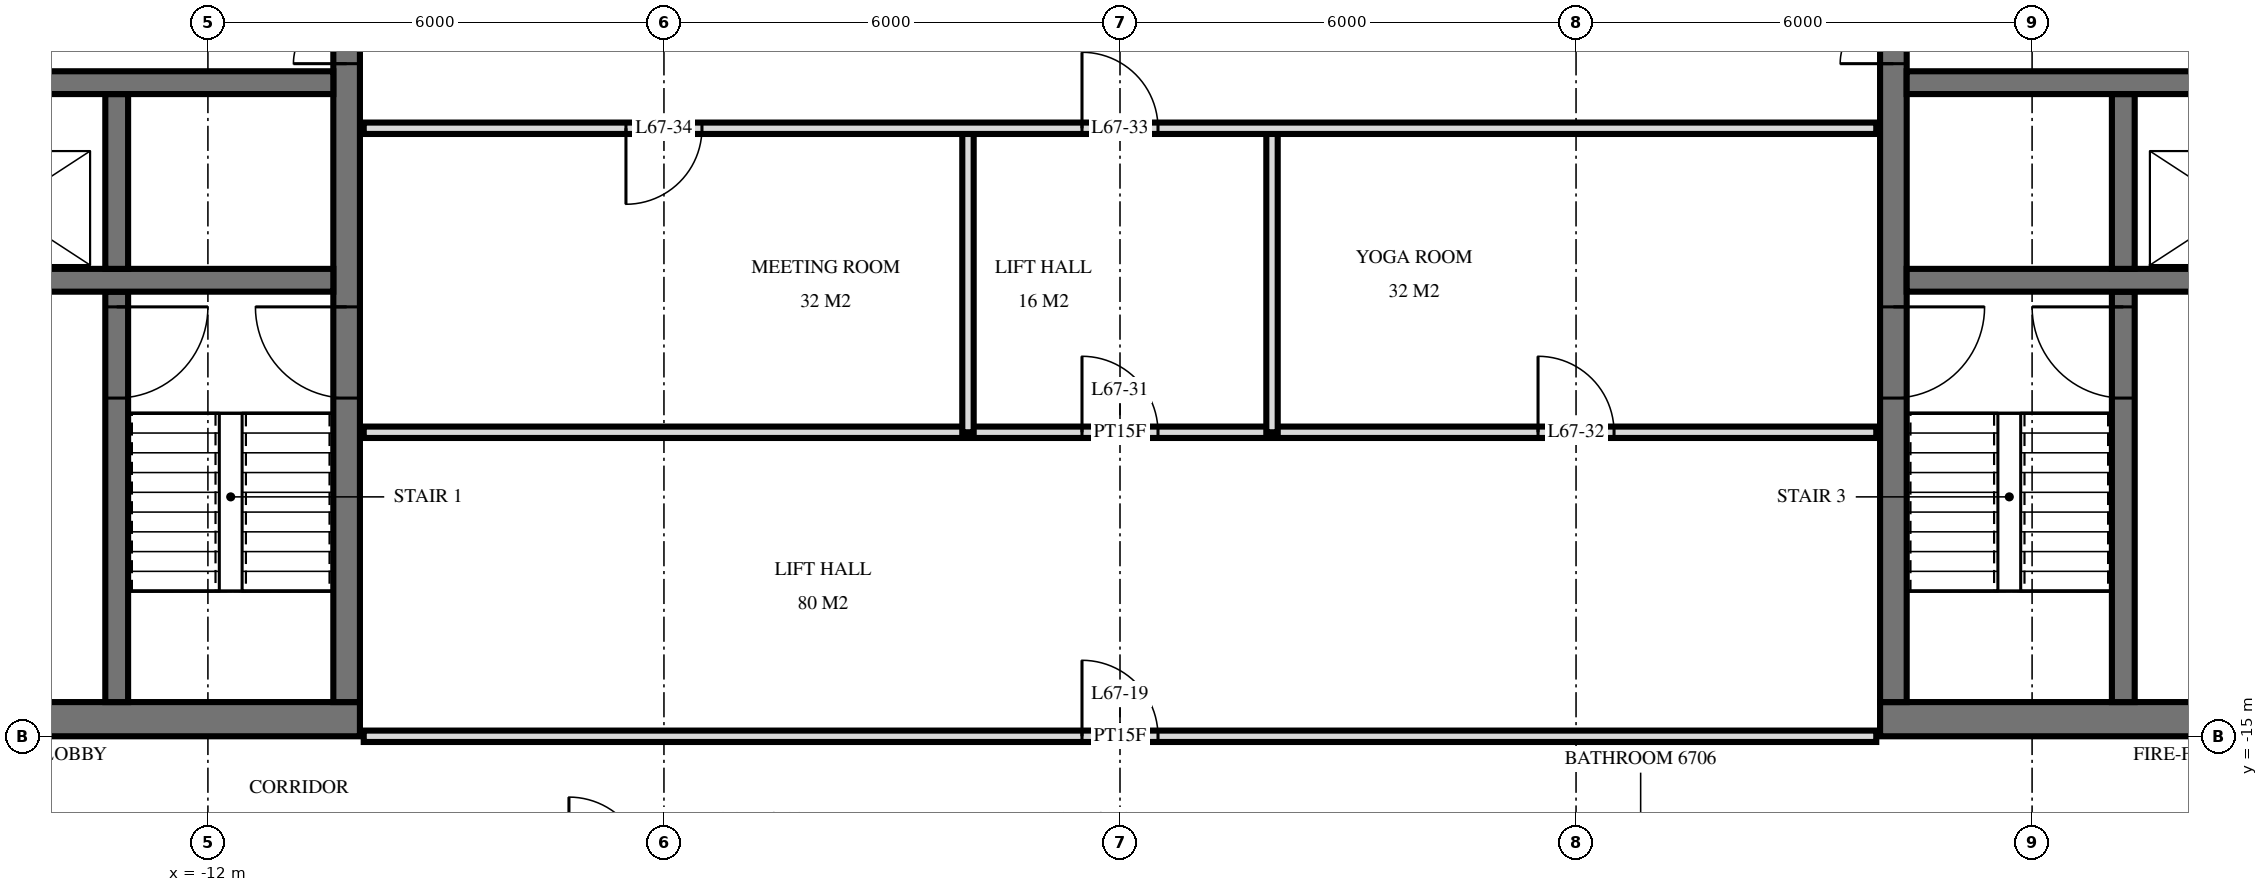
"""IFC4 building model, lengths in metres.
Left out: names, types, materials, properties, quantities, classifications, styles, units other than length and angle.
Written with IfcOpenShell. Run it as: python <this file> out.ifc"""

import sys

from ifc_helpers import new_model, si_unit, direction, frame, frame_2d, origin, place, context, subcontext, project, spatial, rectangle, extrude, element, fill, save


model = new_model("IFC4")
c1 = context("Model", 3, precision=1e-05, world=origin(), true_north=direction((0.0, 1.0)))
c2 = subcontext(c1, "Body", "Model", "MODEL_VIEW")
j1 = project(units=[si_unit("LENGTHUNIT", "METRE"), si_unit("PLANEANGLEUNIT", "RADIAN")], contexts=[c1])
p1 = place(None, origin())
s1 = spatial("IfcSite", under=j1, at=p1, CompositionType="ELEMENT")
p2 = place(p1, origin())
s2 = spatial("IfcBuilding", under=s1, at=p2, CompositionType="ELEMENT")
p3 = place(p2, frame((0.0, 0.0, 256.1)))
s3 = spatial("IfcBuildingStorey", under=s2, at=p3, CompositionType="ELEMENT", Elevation=256.1)
p4 = place(p3, frame((-19.5, -14.775, 0.0), z_axis=(0.0, 0.0, 1.0), x_axis=(1.0, 0.0, 0.0)))
e1 = element("IfcWall", 1, at=p4, inside=s3, PredefinedType="SHEAR", context=c2, shape_type="SweptSolid", body=[
    extrude(rectangle(XDim=9.5, YDim=0.45, at=frame_2d((4.75, 0.0))), origin(), (0.0, 0.0, 1.0), 3.5),
])
p5 = place(p4, frame((1.2, 0.0, 0.0)))
e2 = element("IfcOpeningElement", 2, at=p5, cuts=e1, PredefinedType="OPENING", context=c2, shape_type="SweptSolid", body=[
    extrude(rectangle(XDim=1.2, YDim=2.1, at=frame_2d((0.6, 1.05))), frame((0.0, 0.235, 0.0), z_axis=(0.0, -1.0, 0.0), x_axis=(1.0, 0.0, 0.0)), (0.0, 0.0, 1.0), 0.47),
])
p6 = place(p4, frame((4.25, 0.0, 0.0)))
e3 = element("IfcOpeningElement", 3, at=p6, cuts=e1, PredefinedType="OPENING", context=c2, shape_type="SweptSolid", body=[
    extrude(rectangle(XDim=1.1, YDim=2.1, at=frame_2d((0.55, 1.05))), frame((0.0, 0.235, 0.0), z_axis=(0.0, -1.0, 0.0), x_axis=(1.0, 0.0, 0.0)), (0.0, 0.0, 1.0), 0.47),
])
p7 = place(p3, frame((-10.175, -14.55, 0.0), z_axis=(0.0, 0.0, 1.0), x_axis=(0.0, 1.0, 0.0)))
e4 = element("IfcWall", 4, at=p7, inside=s3, PredefinedType="SHEAR", context=c2, shape_type="SweptSolid", body=[
    extrude(rectangle(XDim=14.1, YDim=0.35, at=frame_2d((7.05, 0.0))), origin(), (0.0, 0.0, 1.0), 3.5),
])
p8 = place(p7, frame((8.4, 0.0, 0.0)))
e5 = element("IfcOpeningElement", 5, at=p8, cuts=e4, PredefinedType="OPENING", context=c2, shape_type="SweptSolid", body=[
    extrude(rectangle(XDim=1.4, YDim=2.4, at=frame_2d((0.7, 1.2))), frame((0.0, 0.185, 0.0), z_axis=(0.0, -1.0, 0.0), x_axis=(1.0, 0.0, 0.0)), (0.0, 0.0, 1.0), 0.37),
])
p9 = place(p7, frame((10.0, 0.0, 0.0)))
e6 = element("IfcOpeningElement", 6, at=p9, cuts=e4, PredefinedType="OPENING", context=c2, shape_type="SweptSolid", body=[
    extrude(rectangle(XDim=1.4, YDim=2.4, at=frame_2d((0.7, 1.2))), frame((0.0, 0.185, 0.0), z_axis=(0.0, -1.0, 0.0), x_axis=(1.0, 0.0, 0.0)), (0.0, 0.0, 1.0), 0.37),
])
p10 = place(p7, frame((4.0, 0.0, 0.0)))
e7 = element("IfcOpeningElement", 7, at=p10, cuts=e4, PredefinedType="OPENING", context=c2, shape_type="SweptSolid", body=[
    extrude(rectangle(XDim=1.2, YDim=2.1, at=frame_2d((0.6, 1.05))), frame((0.0, 0.185, 0.0), z_axis=(0.0, -1.0, 0.0), x_axis=(1.0, 0.0, 0.0)), (0.0, 0.0, 1.0), 0.37),
])
p11 = place(p3, frame((-19.05, -6.4, 0.0), z_axis=(0.0, 0.0, 1.0), x_axis=(1.0, 0.0, 0.0)))
e8 = element("IfcWall", 8, at=p11, inside=s3, PredefinedType="SHEAR", context=c2, shape_type="SweptSolid", body=[
    extrude(rectangle(XDim=8.7, YDim=0.3, at=frame_2d((4.35, 0.0))), origin(), (0.0, 0.0, 1.0), 3.5),
])
p12 = place(p11, frame((0.8, 0.0, 0.0)))
e9 = element("IfcOpeningElement", 9, at=p12, cuts=e8, PredefinedType="OPENING", context=c2, shape_type="SweptSolid", body=[
    extrude(rectangle(XDim=1.1, YDim=2.1, at=frame_2d((0.55, 1.05))), frame((0.0, 0.16, 0.0), z_axis=(0.0, -1.0, 0.0), x_axis=(1.0, 0.0, 0.0)), (0.0, 0.0, 1.0), 0.32),
])
p13 = place(p3, frame((-19.05, -9.0, 0.0), z_axis=(0.0, 0.0, 1.0), x_axis=(1.0, 0.0, 0.0)))
e10 = element("IfcWall", 10, at=p13, inside=s3, PredefinedType="SHEAR", context=c2, shape_type="SweptSolid", body=[
    extrude(rectangle(XDim=8.7, YDim=0.3, at=frame_2d((4.35, 0.0))), origin(), (0.0, 0.0, 1.0), 3.5),
])
p14 = place(p13, frame((3.8, 0.0, 0.0)))
e11 = element("IfcOpeningElement", 11, at=p14, cuts=e10, PredefinedType="OPENING", context=c2, shape_type="SweptSolid", body=[
    extrude(rectangle(XDim=1.1, YDim=2.1, at=frame_2d((0.55, 1.05))), frame((0.0, 0.16, 0.0), z_axis=(0.0, -1.0, 0.0), x_axis=(1.0, 0.0, 0.0)), (0.0, 0.0, 1.0), 0.32),
])
p15 = place(p3, frame((-13.2, -8.85, 0.0), z_axis=(0.0, 0.0, 1.0), x_axis=(0.0, 1.0, 0.0)))
e12 = element("IfcWall", 12, at=p15, inside=s3, PredefinedType="SHEAR", context=c2, shape_type="SweptSolid", body=[
    extrude(rectangle(XDim=2.3, YDim=0.3, at=frame_2d((1.15, 0.0))), origin(), (0.0, 0.0, 1.0), 3.5),
])
p16 = place(p3, frame((-13.2, -14.55, 0.0), z_axis=(0.0, 0.0, 1.0), x_axis=(0.0, 1.0, 0.0)))
e13 = element("IfcWall", 13, at=p16, inside=s3, PredefinedType="SHEAR", context=c2, shape_type="SweptSolid", body=[
    extrude(rectangle(XDim=5.4, YDim=0.3, at=frame_2d((2.7, 0.0))), origin(), (0.0, 0.0, 1.0), 3.5),
])
p17 = place(p16, frame((4.0, 0.0, 0.0)))
e14 = element("IfcOpeningElement", 14, at=p17, cuts=e13, PredefinedType="OPENING", context=c2, shape_type="SweptSolid", body=[
    extrude(rectangle(XDim=1.2, YDim=2.1, at=frame_2d((0.6, 1.05))), frame((0.0, 0.16, 0.0), z_axis=(0.0, -1.0, 0.0), x_axis=(1.0, 0.0, 0.0)), (0.0, 0.0, 1.0), 0.32),
])
p18 = place(p3, frame((10.0, -14.775, 0.0), z_axis=(0.0, 0.0, 1.0), x_axis=(1.0, 0.0, 0.0)))
e15 = element("IfcWall", 15, at=p18, inside=s3, PredefinedType="SHEAR", context=c2, shape_type="SweptSolid", body=[
    extrude(rectangle(XDim=9.5, YDim=0.45, at=frame_2d((4.75, 0.0))), origin(), (0.0, 0.0, 1.0), 3.5),
])
p19 = place(p18, frame((7.1, 0.0, 0.0)))
e16 = element("IfcOpeningElement", 16, at=p19, cuts=e15, PredefinedType="OPENING", context=c2, shape_type="SweptSolid", body=[
    extrude(rectangle(XDim=1.2, YDim=2.1, at=frame_2d((0.6, 1.05))), frame((0.0, 0.235, 0.0), z_axis=(0.0, -1.0, 0.0), x_axis=(1.0, 0.0, 0.0)), (0.0, 0.0, 1.0), 0.47),
])
p20 = place(p18, frame((4.15, 0.0, 0.0)))
e17 = element("IfcOpeningElement", 17, at=p20, cuts=e15, PredefinedType="OPENING", context=c2, shape_type="SweptSolid", body=[
    extrude(rectangle(XDim=1.1, YDim=2.1, at=frame_2d((0.55, 1.05))), frame((0.0, 0.235, 0.0), z_axis=(0.0, -1.0, 0.0), x_axis=(1.0, 0.0, 0.0)), (0.0, 0.0, 1.0), 0.47),
])
p21 = place(p3, frame((10.175, -14.55, 0.0), z_axis=(0.0, 0.0, 1.0), x_axis=(0.0, 1.0, 0.0)))
e18 = element("IfcWall", 18, at=p21, inside=s3, PredefinedType="SHEAR", context=c2, shape_type="SweptSolid", body=[
    extrude(rectangle(XDim=14.1, YDim=0.35, at=frame_2d((7.05, 0.0))), origin(), (0.0, 0.0, 1.0), 3.5),
])
p22 = place(p21, frame((8.4, 0.0, 0.0)))
e19 = element("IfcOpeningElement", 19, at=p22, cuts=e18, PredefinedType="OPENING", context=c2, shape_type="SweptSolid", body=[
    extrude(rectangle(XDim=1.4, YDim=2.4, at=frame_2d((0.7, 1.2))), frame((0.0, 0.185, 0.0), z_axis=(0.0, -1.0, 0.0), x_axis=(1.0, 0.0, 0.0)), (0.0, 0.0, 1.0), 0.37),
])
p23 = place(p21, frame((10.0, 0.0, 0.0)))
e20 = element("IfcOpeningElement", 20, at=p23, cuts=e18, PredefinedType="OPENING", context=c2, shape_type="SweptSolid", body=[
    extrude(rectangle(XDim=1.4, YDim=2.4, at=frame_2d((0.7, 1.2))), frame((0.0, 0.185, 0.0), z_axis=(0.0, -1.0, 0.0), x_axis=(1.0, 0.0, 0.0)), (0.0, 0.0, 1.0), 0.37),
])
p24 = place(p21, frame((4.0, 0.0, 0.0)))
e21 = element("IfcOpeningElement", 21, at=p24, cuts=e18, PredefinedType="OPENING", context=c2, shape_type="SweptSolid", body=[
    extrude(rectangle(XDim=1.2, YDim=2.1, at=frame_2d((0.6, 1.05))), frame((0.0, 0.185, 0.0), z_axis=(0.0, -1.0, 0.0), x_axis=(1.0, 0.0, 0.0)), (0.0, 0.0, 1.0), 0.37),
])
p25 = place(p3, frame((10.35, -6.4, 0.0), z_axis=(0.0, 0.0, 1.0), x_axis=(1.0, 0.0, 0.0)))
e22 = element("IfcWall", 22, at=p25, inside=s3, PredefinedType="SHEAR", context=c2, shape_type="SweptSolid", body=[
    extrude(rectangle(XDim=8.7, YDim=0.3, at=frame_2d((4.35, 0.0))), origin(), (0.0, 0.0, 1.0), 3.5),
])
p26 = place(p25, frame((6.8, 0.0, 0.0)))
e23 = element("IfcOpeningElement", 23, at=p26, cuts=e22, PredefinedType="OPENING", context=c2, shape_type="SweptSolid", body=[
    extrude(rectangle(XDim=1.1, YDim=2.1, at=frame_2d((0.55, 1.05))), frame((0.0, 0.16, 0.0), z_axis=(0.0, -1.0, 0.0), x_axis=(1.0, 0.0, 0.0)), (0.0, 0.0, 1.0), 0.32),
])
p27 = place(p3, frame((10.35, -9.0, 0.0), z_axis=(0.0, 0.0, 1.0), x_axis=(1.0, 0.0, 0.0)))
e24 = element("IfcWall", 24, at=p27, inside=s3, PredefinedType="SHEAR", context=c2, shape_type="SweptSolid", body=[
    extrude(rectangle(XDim=8.7, YDim=0.3, at=frame_2d((4.35, 0.0))), origin(), (0.0, 0.0, 1.0), 3.5),
])
p28 = place(p27, frame((3.8, 0.0, 0.0)))
e25 = element("IfcOpeningElement", 25, at=p28, cuts=e24, PredefinedType="OPENING", context=c2, shape_type="SweptSolid", body=[
    extrude(rectangle(XDim=1.1, YDim=2.1, at=frame_2d((0.55, 1.05))), frame((0.0, 0.16, 0.0), z_axis=(0.0, -1.0, 0.0), x_axis=(1.0, 0.0, 0.0)), (0.0, 0.0, 1.0), 0.32),
])
p29 = place(p3, frame((13.2, -8.85, 0.0), z_axis=(0.0, 0.0, 1.0), x_axis=(0.0, 1.0, 0.0)))
e26 = element("IfcWall", 26, at=p29, inside=s3, PredefinedType="SHEAR", context=c2, shape_type="SweptSolid", body=[
    extrude(rectangle(XDim=2.3, YDim=0.3, at=frame_2d((1.15, 0.0))), origin(), (0.0, 0.0, 1.0), 3.5),
])
p30 = place(p3, frame((13.2, -14.55, 0.0), z_axis=(0.0, 0.0, 1.0), x_axis=(0.0, 1.0, 0.0)))
e27 = element("IfcWall", 27, at=p30, inside=s3, PredefinedType="SHEAR", context=c2, shape_type="SweptSolid", body=[
    extrude(rectangle(XDim=5.4, YDim=0.3, at=frame_2d((2.7, 0.0))), origin(), (0.0, 0.0, 1.0), 3.5),
])
p31 = place(p30, frame((4.0, 0.0, 0.0)))
e28 = element("IfcOpeningElement", 28, at=p31, cuts=e27, PredefinedType="OPENING", context=c2, shape_type="SweptSolid", body=[
    extrude(rectangle(XDim=1.2, YDim=2.1, at=frame_2d((0.6, 1.05))), frame((0.0, 0.16, 0.0), z_axis=(0.0, -1.0, 0.0), x_axis=(1.0, 0.0, 0.0)), (0.0, 0.0, 1.0), 0.32),
])
for number, where, z_axis, x_axis in (
    (29, (2.0, -11.0, 0.0), (0.0, 0.0, 1.0), (0.0, 1.0, 0.0)),
    (30, (-2.0, -11.0, 0.0), (0.0, 0.0, 1.0), (0.0, 1.0, 0.0)),
):
    element("IfcWall", number, at=place(p3, frame(where, z_axis=z_axis, x_axis=x_axis)), inside=s3, PredefinedType="PARTITIONING", context=c2, shape_type="SweptSolid", body=[
        extrude(rectangle(XDim=4.0, YDim=0.15, at=frame_2d((2.0, 0.0))), origin(), (0.0, 0.0, 1.0), 3.22),
    ])
p32 = place(p3, frame((-9.95, -15.0, 0.0), z_axis=(0.0, 0.0, 1.0), x_axis=(1.0, 0.0, 0.0)))
e31 = element("IfcWall", 31, at=p32, inside=s3, PredefinedType="PARTITIONING", context=c2, shape_type="SweptSolid", body=[
    extrude(rectangle(XDim=19.9, YDim=0.15, at=frame_2d((9.95, 0.0))), origin(), (0.0, 0.0, 1.0), 2.584),
])
p33 = place(p32, frame((9.45, 0.0, 0.0)))
e32 = element("IfcOpeningElement", 32, at=p33, cuts=e31, PredefinedType="OPENING", context=c2, shape_type="SweptSolid", body=[
    extrude(rectangle(XDim=1.0, YDim=2.1, at=frame_2d((0.5, 1.05))), frame((0.0, 0.085, 0.0), z_axis=(0.0, -1.0, 0.0), x_axis=(1.0, 0.0, 0.0)), (0.0, 0.0, 1.0), 0.17),
])
p34 = place(p3, frame((-9.95, -11.0, 0.0), z_axis=(0.0, 0.0, 1.0), x_axis=(1.0, 0.0, 0.0)))
e33 = element("IfcWall", 33, at=p34, inside=s3, PredefinedType="PARTITIONING", context=c2, shape_type="SweptSolid", body=[
    extrude(rectangle(XDim=19.9, YDim=0.15, at=frame_2d((9.95, 0.0))), origin(), (0.0, 0.0, 1.0), 3.22),
])
p35 = place(p34, frame((9.45, 0.0, 0.0)))
e34 = element("IfcOpeningElement", 34, at=p35, cuts=e33, PredefinedType="OPENING", context=c2, shape_type="SweptSolid", body=[
    extrude(rectangle(XDim=1.0, YDim=2.1, at=frame_2d((0.5, 1.05))), frame((0.0, 0.085, 0.0), z_axis=(0.0, -1.0, 0.0), x_axis=(1.0, 0.0, 0.0)), (0.0, 0.0, 1.0), 0.17),
])
p36 = place(p34, frame((15.45, 0.0, 0.0)))
e35 = element("IfcOpeningElement", 35, at=p36, cuts=e33, PredefinedType="OPENING", context=c2, shape_type="SweptSolid", body=[
    extrude(rectangle(XDim=1.0, YDim=2.1, at=frame_2d((0.5, 1.05))), frame((0.0, 0.085, 0.0), z_axis=(0.0, -1.0, 0.0), x_axis=(1.0, 0.0, 0.0)), (0.0, 0.0, 1.0), 0.17),
])
p37 = place(p3, frame((-9.95, -7.0, 0.0), z_axis=(0.0, 0.0, 1.0), x_axis=(1.0, 0.0, 0.0)))
e36 = element("IfcWall", 36, at=p37, inside=s3, PredefinedType="PARTITIONING", context=c2, shape_type="SweptSolid", body=[
    extrude(rectangle(XDim=19.9, YDim=0.15, at=frame_2d((9.95, 0.0))), origin(), (0.0, 0.0, 1.0), 3.22),
])
p38 = place(p37, frame((9.45, 0.0, 0.0)))
e37 = element("IfcOpeningElement", 37, at=p38, cuts=e36, PredefinedType="OPENING", context=c2, shape_type="SweptSolid", body=[
    extrude(rectangle(XDim=1.0, YDim=2.1, at=frame_2d((0.5, 1.05))), frame((0.0, 0.085, 0.0), z_axis=(0.0, -1.0, 0.0), x_axis=(1.0, 0.0, 0.0)), (0.0, 0.0, 1.0), 0.17),
])
p39 = place(p37, frame((3.45, 0.0, 0.0)))
e38 = element("IfcOpeningElement", 38, at=p39, cuts=e36, PredefinedType="OPENING", context=c2, shape_type="SweptSolid", body=[
    extrude(rectangle(XDim=1.0, YDim=2.1, at=frame_2d((0.5, 1.05))), frame((0.0, 0.085, 0.0), z_axis=(0.0, -1.0, 0.0), x_axis=(1.0, 0.0, 0.0)), (0.0, 0.0, 1.0), 0.17),
])
p40 = place(p8, origin())
e39 = element("IfcDoor", 39, at=p40, inside=s3, OperationType="DOUBLE_DOOR_SINGLE_SWING", PredefinedType="DOOR", context=c2, shape_type="SweptSolid", body=[
    extrude(rectangle(XDim=1.4, YDim=2.4, at=frame_2d((0.7, 1.2))), frame((0.0, 0.025, 0.0), z_axis=(0.0, -1.0, 0.0), x_axis=(1.0, 0.0, 0.0)), (0.0, 0.0, 1.0), 0.05),
])
fill(e5, e39)
p41 = place(p10, origin())
e40 = element("IfcDoor", 40, at=p41, inside=s3, OperationType="SINGLE_SWING_LEFT", PredefinedType="DOOR", context=c2, shape_type="SweptSolid", body=[
    extrude(rectangle(XDim=1.2, YDim=2.1, at=frame_2d((0.6, 1.05))), frame((0.0, 0.025, 0.0), z_axis=(0.0, -1.0, 0.0), x_axis=(1.0, 0.0, 0.0)), (0.0, 0.0, 1.0), 0.05),
])
fill(e7, e40)
p42 = place(p17, frame((0.6, 0.0, 0.0), z_axis=(0.0, 0.0, 1.0), x_axis=(-1.0, 0.0, 0.0)))
e41 = element("IfcDoor", 41, at=p42, inside=s3, OperationType="SINGLE_SWING_RIGHT", PredefinedType="DOOR", context=c2, shape_type="SweptSolid", body=[
    extrude(rectangle(XDim=1.2, YDim=2.1, at=frame_2d((0.0, 1.05))), frame((0.0, -0.025, 0.0), z_axis=(0.0, 1.0, 0.0), x_axis=(-1.0, 0.0, 0.0)), (0.0, 0.0, 1.0), 0.05),
])
fill(e14, e41)
p43 = place(p22, origin())
e42 = element("IfcDoor", 42, at=p43, inside=s3, OperationType="DOUBLE_DOOR_SINGLE_SWING", PredefinedType="DOOR", context=c2, shape_type="SweptSolid", body=[
    extrude(rectangle(XDim=1.4, YDim=2.4, at=frame_2d((0.7, 1.2))), frame((0.0, 0.025, 0.0), z_axis=(0.0, -1.0, 0.0), x_axis=(1.0, 0.0, 0.0)), (0.0, 0.0, 1.0), 0.05),
])
fill(e19, e42)
p44 = place(p24, frame((0.6, 0.0, 0.0), z_axis=(0.0, 0.0, 1.0), x_axis=(-1.0, 0.0, 0.0)))
e43 = element("IfcDoor", 43, at=p44, inside=s3, OperationType="SINGLE_SWING_RIGHT", PredefinedType="DOOR", context=c2, shape_type="SweptSolid", body=[
    extrude(rectangle(XDim=1.2, YDim=2.1, at=frame_2d((0.0, 1.05))), frame((0.0, -0.025, 0.0), z_axis=(0.0, 1.0, 0.0), x_axis=(-1.0, 0.0, 0.0)), (0.0, 0.0, 1.0), 0.05),
])
fill(e21, e43)
p45 = place(p31, origin())
e44 = element("IfcDoor", 44, at=p45, inside=s3, OperationType="SINGLE_SWING_LEFT", PredefinedType="DOOR", context=c2, shape_type="SweptSolid", body=[
    extrude(rectangle(XDim=1.2, YDim=2.1, at=frame_2d((0.6, 1.05))), frame((0.0, 0.025, 0.0), z_axis=(0.0, -1.0, 0.0), x_axis=(1.0, 0.0, 0.0)), (0.0, 0.0, 1.0), 0.05),
])
fill(e28, e44)
p46 = place(p33, origin())
e45 = element("IfcDoor", 45, at=p46, inside=s3, OperationType="SINGLE_SWING_RIGHT", PredefinedType="DOOR", context=c2, shape_type="SweptSolid", body=[
    extrude(rectangle(XDim=1.0, YDim=2.1, at=frame_2d((0.5, 1.05))), frame((0.0, 0.025, 0.0), z_axis=(0.0, -1.0, 0.0), x_axis=(1.0, 0.0, 0.0)), (0.0, 0.0, 1.0), 0.05),
])
fill(e32, e45)
p47 = place(p35, origin())
e46 = element("IfcDoor", 46, at=p47, inside=s3, OperationType="SINGLE_SWING_RIGHT", PredefinedType="DOOR", context=c2, shape_type="SweptSolid", body=[
    extrude(rectangle(XDim=1.0, YDim=2.1, at=frame_2d((0.5, 1.05))), frame((0.0, 0.025, 0.0), z_axis=(0.0, -1.0, 0.0), x_axis=(1.0, 0.0, 0.0)), (0.0, 0.0, 1.0), 0.05),
])
fill(e34, e46)
p48 = place(p36, origin())
e47 = element("IfcDoor", 47, at=p48, inside=s3, OperationType="SINGLE_SWING_RIGHT", PredefinedType="DOOR", context=c2, shape_type="SweptSolid", body=[
    extrude(rectangle(XDim=1.0, YDim=2.1, at=frame_2d((0.5, 1.05))), frame((0.0, 0.025, 0.0), z_axis=(0.0, -1.0, 0.0), x_axis=(1.0, 0.0, 0.0)), (0.0, 0.0, 1.0), 0.05),
])
fill(e35, e47)
p49 = place(p38, origin())
e48 = element("IfcDoor", 48, at=p49, inside=s3, OperationType="SINGLE_SWING_RIGHT", PredefinedType="DOOR", context=c2, shape_type="SweptSolid", body=[
    extrude(rectangle(XDim=1.0, YDim=2.1, at=frame_2d((0.5, 1.05))), frame((0.0, 0.025, 0.0), z_axis=(0.0, -1.0, 0.0), x_axis=(1.0, 0.0, 0.0)), (0.0, 0.0, 1.0), 0.05),
])
fill(e37, e48)
p50 = place(p39, frame((0.5, 0.0, 0.0), z_axis=(0.0, 0.0, 1.0), x_axis=(-1.0, 0.0, 0.0)))
e49 = element("IfcDoor", 49, at=p50, inside=s3, OperationType="SINGLE_SWING_LEFT", PredefinedType="DOOR", context=c2, shape_type="SweptSolid", body=[
    extrude(rectangle(XDim=1.0, YDim=2.1, at=frame_2d((0.0, 1.05))), frame((0.0, -0.025, 0.0), z_axis=(0.0, 1.0, 0.0), x_axis=(-1.0, 0.0, 0.0)), (0.0, 0.0, 1.0), 0.05),
])
fill(e38, e49)
save(model, sys.argv[1])
